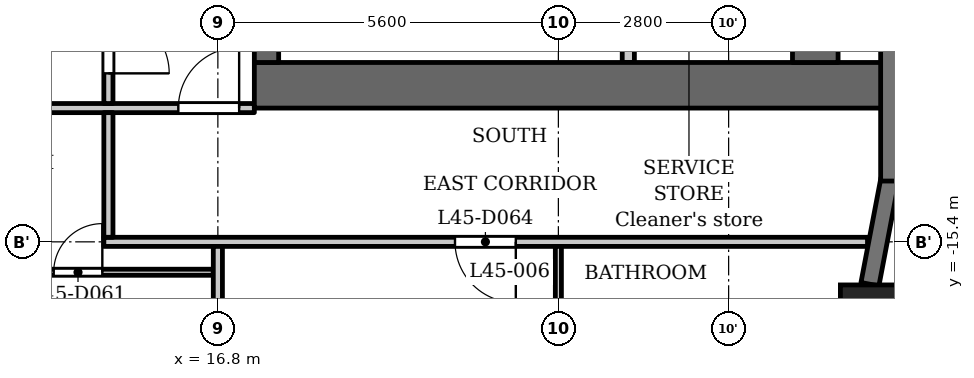
"""IFC4 building model, lengths in metres.
Left out: names, types, materials, properties, quantities, classifications, styles, units other than length and angle.
Written with IfcOpenShell. Run it as: python <this file> out.ifc"""

import sys

from ifc_helpers import new_model, si_unit, direction, frame, frame_2d, origin, origin_2d, place, context, subcontext, project, spatial, rectangle, extrude, element, fill, save


model = new_model("IFC4")
c1 = context("Model", 3, precision=1e-05, world=origin(), true_north=direction((0.0, 1.0)))
c2 = subcontext(c1, "Body", "Model", "MODEL_VIEW")
j1 = project(units=[si_unit("LENGTHUNIT", "METRE"), si_unit("PLANEANGLEUNIT", "RADIAN")], contexts=[c1])
p1 = place(None, origin())
s1 = spatial("IfcSite", under=j1, at=p1, CompositionType="ELEMENT")
p2 = place(p1, origin())
s2 = spatial("IfcBuilding", under=s1, at=p2, CompositionType="ELEMENT")
p3 = place(p2, frame((0.0, 0.0, 174.6)))
s3 = spatial("IfcBuildingStorey", under=s2, at=p3, CompositionType="ELEMENT", Elevation=174.6)
p4 = place(p3, frame((27.538, -16.609, 0.0), z_axis=(0.0, 0.0, 1.0), x_axis=(1.0, 0.0, 0.0)))
e1 = element("IfcColumn", 1, at=p4, inside=s3, PredefinedType="COLUMN", context=c2, shape_type="SweptSolid", body=[
    extrude(rectangle(XDim=1.0, YDim=1.0, at=origin_2d()), origin(), (0.0, 0.0, 1.0), 3.5),
])
p5 = place(p3, frame((27.524, -16.097, 0.0), z_axis=(0.0, 0.0, 1.0), x_axis=(0.187259034321, 0.982310569049, 0.0)))
e2 = element("IfcWall", 2, at=p5, inside=s3, PredefinedType="SOLIDWALL", context=c2, shape_type="SweptSolid", body=[
    extrude(rectangle(XDim=1.756, YDim=0.3, at=frame_2d((0.878, 0.0))), origin(), (0.0, 0.0, 1.0), 2.4),
])
p6 = place(p3, frame((27.85, -14.4, 0.0), z_axis=(0.0, 0.0, 1.0), x_axis=(0.0, 1.0, 0.0)))
e3 = element("IfcWall", 3, at=p6, inside=s3, PredefinedType="SOLIDWALL", context=c2, shape_type="SweptSolid", body=[
    extrude(rectangle(XDim=2.7, YDim=0.3, at=frame_2d((1.35, 0.0))), origin(), (0.0, 0.0, 1.0), 2.4),
])
p7 = place(p3, frame((17.4, -12.825, 0.0), z_axis=(0.0, 0.0, 1.0), x_axis=(1.0, 0.0, 0.0)))
e4 = element("IfcWall", 4, at=p7, inside=s3, PredefinedType="SHEAR", context=c2, shape_type="SweptSolid", body=[
    extrude(rectangle(XDim=10.4, YDim=0.75, at=frame_2d((5.2, 0.0))), origin(), (0.0, 0.0, 1.0), 3.15),
])
p8 = place(p3, frame((17.6, -12.45, 0.0), z_axis=(0.0, 0.0, 1.0), x_axis=(0.0, 1.0, 0.0)))
e5 = element("IfcWall", 5, at=p8, inside=s3, PredefinedType="SHEAR", context=c2, shape_type="SweptSolid", body=[
    extrude(rectangle(XDim=24.9, YDim=0.4, at=frame_2d((12.45, 0.0))), origin(), (0.0, 0.0, 1.0), 3.15),
])
p9 = place(p8, frame((8.65, 0.0, 0.0)))
e6 = element("IfcOpeningElement", 6, at=p9, cuts=e5, PredefinedType="OPENING", context=c2, shape_type="SweptSolid", body=[
    extrude(rectangle(XDim=0.9, YDim=2.1, at=frame_2d((0.45, 1.05))), frame((0.0, 0.21, 0.0), z_axis=(0.0, -1.0, 0.0), x_axis=(1.0, 0.0, 0.0)), (0.0, 0.0, 1.0), 0.42),
])
p10 = place(p8, frame((15.6, 0.0, 0.0)))
e7 = element("IfcOpeningElement", 7, at=p10, cuts=e5, PredefinedType="OPENING", context=c2, shape_type="SweptSolid", body=[
    extrude(rectangle(XDim=1.1, YDim=2.1, at=frame_2d((0.55, 1.05))), frame((0.0, 0.21, 0.0), z_axis=(0.0, -1.0, 0.0), x_axis=(1.0, 0.0, 0.0)), (0.0, 0.0, 1.0), 0.42),
])
p11 = place(p8, frame((18.0, 0.0, 0.0)))
e8 = element("IfcOpeningElement", 8, at=p11, cuts=e5, PredefinedType="OPENING", context=c2, shape_type="SweptSolid", body=[
    extrude(rectangle(XDim=1.1, YDim=2.1, at=frame_2d((0.55, 1.05))), frame((0.0, 0.21, 0.0), z_axis=(0.0, -1.0, 0.0), x_axis=(1.0, 0.0, 0.0)), (0.0, 0.0, 1.0), 0.42),
])
p12 = place(p8, frame((23.025, 0.0, 0.0)))
e9 = element("IfcOpeningElement", 9, at=p12, cuts=e5, PredefinedType="OPENING", context=c2, shape_type="SweptSolid", body=[
    extrude(rectangle(XDim=1.1, YDim=2.1, at=frame_2d((0.55, 1.05))), frame((0.0, 0.21, 0.0), z_axis=(0.0, -1.0, 0.0), x_axis=(1.0, 0.0, 0.0)), (0.0, 0.0, 1.0), 0.42),
])
p13 = place(p8, frame((0.775, 0.0, 0.0)))
e10 = element("IfcOpeningElement", 10, at=p13, cuts=e5, PredefinedType="OPENING", context=c2, shape_type="SweptSolid", body=[
    extrude(rectangle(XDim=1.1, YDim=2.1, at=frame_2d((0.55, 1.05))), frame((0.0, 0.21, 0.0), z_axis=(0.0, -1.0, 0.0), x_axis=(1.0, 0.0, 0.0)), (0.0, 0.0, 1.0), 0.42),
])
p14 = place(p8, frame((12.925, 0.0, 0.0)))
e11 = element("IfcOpeningElement", 11, at=p14, cuts=e5, PredefinedType="OPENING", context=c2, shape_type="SweptSolid", body=[
    extrude(rectangle(XDim=1.8, YDim=2.1, at=frame_2d((0.9, 1.05))), frame((0.0, 0.21, 0.0), z_axis=(0.0, -1.0, 0.0), x_axis=(1.0, 0.0, 0.0)), (0.0, 0.0, 1.0), 0.42),
])
p15 = place(p3, frame((26.625, -12.45, 0.0), z_axis=(0.0, 0.0, 1.0), x_axis=(0.0, 1.0, 0.0)))
e12 = element("IfcWall", 12, at=p15, inside=s3, PredefinedType="SHEAR", context=c2, shape_type="SweptSolid", body=[
    extrude(rectangle(XDim=24.9, YDim=0.75, at=frame_2d((12.45, 0.0))), origin(), (0.0, 0.0, 1.0), 3.15),
])
p16 = place(p3, frame((23.55, -12.45, 0.0), z_axis=(0.0, 0.0, 1.0), x_axis=(0.0, 1.0, 0.0)))
e13 = element("IfcWall", 13, at=p16, inside=s3, PredefinedType="PARTITIONING", context=c2, shape_type="SweptSolid", body=[
    extrude(rectangle(XDim=2.65, YDim=0.2, at=frame_2d((1.325, 0.0))), origin(), (0.0, 0.0, 1.0), 3.15),
])
p17 = place(p16, frame((0.875, 0.0, 0.0)))
e14 = element("IfcOpeningElement", 14, at=p17, cuts=e13, PredefinedType="OPENING", context=c2, shape_type="SweptSolid", body=[
    extrude(rectangle(XDim=0.9, YDim=2.1, at=frame_2d((0.45, 1.05))), frame((0.0, 0.11, 0.0), z_axis=(0.0, -1.0, 0.0), x_axis=(1.0, 0.0, 0.0)), (0.0, 0.0, 1.0), 0.22),
])
p18 = place(p3, frame((-16.725, -15.9, 0.0), z_axis=(0.0, 0.0, 1.0), x_axis=(1.0, 0.0, 0.0)))
e15 = element("IfcWall", 15, at=p18, inside=s3, PredefinedType="PARTITIONING", context=c2, shape_type="SweptSolid", body=[
    extrude(rectangle(XDim=33.45, YDim=0.1, at=frame_2d((16.725, 0.0))), origin(), (0.0, 0.0, 1.0), 3.15),
])
p19 = place(p18, frame((9.675, 0.0, 0.0)))
e16 = element("IfcOpeningElement", 16, at=p19, cuts=e15, PredefinedType="OPENING", context=c2, shape_type="SweptSolid", body=[
    extrude(rectangle(XDim=0.8, YDim=2.1, at=frame_2d((0.4, 1.05))), frame((0.0, 0.06, 0.0), z_axis=(0.0, -1.0, 0.0), x_axis=(1.0, 0.0, 0.0)), (0.0, 0.0, 1.0), 0.12),
])
p20 = place(p18, frame((4.075, 0.0, 0.0)))
e17 = element("IfcOpeningElement", 17, at=p20, cuts=e15, PredefinedType="OPENING", context=c2, shape_type="SweptSolid", body=[
    extrude(rectangle(XDim=0.9, YDim=2.1, at=frame_2d((0.45, 1.05))), frame((0.0, 0.06, 0.0), z_axis=(0.0, -1.0, 0.0), x_axis=(1.0, 0.0, 0.0)), (0.0, 0.0, 1.0), 0.12),
])
p21 = place(p18, frame((20.875, 0.0, 0.0)))
e18 = element("IfcOpeningElement", 18, at=p21, cuts=e15, PredefinedType="OPENING", context=c2, shape_type="SweptSolid", body=[
    extrude(rectangle(XDim=0.8, YDim=2.1, at=frame_2d((0.4, 1.05))), frame((0.0, 0.06, 0.0), z_axis=(0.0, -1.0, 0.0), x_axis=(1.0, 0.0, 0.0)), (0.0, 0.0, 1.0), 0.12),
])
p22 = place(p18, frame((15.275, 0.0, 0.0)))
e19 = element("IfcOpeningElement", 19, at=p22, cuts=e15, PredefinedType="OPENING", context=c2, shape_type="SweptSolid", body=[
    extrude(rectangle(XDim=0.9, YDim=2.1, at=frame_2d((0.45, 1.05))), frame((0.0, 0.06, 0.0), z_axis=(0.0, -1.0, 0.0), x_axis=(1.0, 0.0, 0.0)), (0.0, 0.0, 1.0), 0.12),
])
p23 = place(p18, frame((30.825, 0.0, 0.0)))
e20 = element("IfcOpeningElement", 20, at=p23, cuts=e15, PredefinedType="OPENING", context=c2, shape_type="SweptSolid", body=[
    extrude(rectangle(XDim=0.8, YDim=2.1, at=frame_2d((0.4, 1.05))), frame((0.0, 0.06, 0.0), z_axis=(0.0, -1.0, 0.0), x_axis=(1.0, 0.0, 0.0)), (0.0, 0.0, 1.0), 0.12),
])
p24 = place(p18, frame((26.475, 0.0, 0.0)))
e21 = element("IfcOpeningElement", 21, at=p24, cuts=e15, PredefinedType="OPENING", context=c2, shape_type="SweptSolid", body=[
    extrude(rectangle(XDim=0.9, YDim=2.1, at=frame_2d((0.45, 1.05))), frame((0.0, 0.06, 0.0), z_axis=(0.0, -1.0, 0.0), x_axis=(1.0, 0.0, 0.0)), (0.0, 0.0, 1.0), 0.12),
])
p25 = place(p3, frame((14.925, -15.4, 0.0), z_axis=(0.0, 0.0, 1.0), x_axis=(1.0, 0.0, 0.0)))
e22 = element("IfcWall", 22, at=p25, inside=s3, PredefinedType="PARTITIONING", context=c2, shape_type="SweptSolid", body=[
    extrude(rectangle(XDim=12.559, YDim=0.15, at=frame_2d((6.279, 0.0))), origin(), (0.0, 0.0, 1.0), 3.15),
])
p26 = place(p25, frame((5.775, 0.0, 0.0)))
e23 = element("IfcOpeningElement", 23, at=p26, cuts=e22, PredefinedType="OPENING", context=c2, shape_type="SweptSolid", body=[
    extrude(rectangle(XDim=1.0, YDim=2.1, at=frame_2d((0.5, 1.05))), frame((0.0, 0.085, 0.0), z_axis=(0.0, -1.0, 0.0), x_axis=(1.0, 0.0, 0.0)), (0.0, 0.0, 1.0), 0.17),
])
p27 = place(p3, frame((-17.4, -13.2, 0.0), z_axis=(0.0, 0.0, 1.0), x_axis=(1.0, 0.0, 0.0)))
e24 = element("IfcWall", 24, at=p27, inside=s3, PredefinedType="PARTITIONING", context=c2, shape_type="SweptSolid", body=[
    extrude(rectangle(XDim=34.8, YDim=0.15, at=frame_2d((17.4, 0.0))), origin(), (0.0, 0.0, 1.0), 3.15),
])
p28 = place(p27, frame((0.15, 0.0, 0.0)))
e25 = element("IfcOpeningElement", 25, at=p28, cuts=e24, PredefinedType="OPENING", context=c2, shape_type="SweptSolid", body=[
    extrude(rectangle(XDim=1.0, YDim=2.1, at=frame_2d((0.5, 1.05))), frame((0.0, 0.085, 0.0), z_axis=(0.0, -1.0, 0.0), x_axis=(1.0, 0.0, 0.0)), (0.0, 0.0, 1.0), 0.17),
])
p29 = place(p27, frame((33.55, 0.0, 0.0)))
e26 = element("IfcOpeningElement", 26, at=p29, cuts=e24, PredefinedType="OPENING", context=c2, shape_type="SweptSolid", body=[
    extrude(rectangle(XDim=1.0, YDim=2.1, at=frame_2d((0.5, 1.05))), frame((0.0, 0.085, 0.0), z_axis=(0.0, -1.0, 0.0), x_axis=(1.0, 0.0, 0.0)), (0.0, 0.0, 1.0), 0.17),
])
p30 = place(p27, frame((15.7, 0.0, 0.0)))
e27 = element("IfcOpeningElement", 27, at=p30, cuts=e24, PredefinedType="OPENING", context=c2, shape_type="SweptSolid", body=[
    extrude(rectangle(XDim=1.0, YDim=2.1, at=frame_2d((0.5, 1.05))), frame((0.0, 0.085, 0.0), z_axis=(0.0, -1.0, 0.0), x_axis=(1.0, 0.0, 0.0)), (0.0, 0.0, 1.0), 0.17),
])
p31 = place(p27, frame((26.9, 0.0, 0.0)))
e28 = element("IfcOpeningElement", 28, at=p31, cuts=e24, PredefinedType="OPENING", context=c2, shape_type="SweptSolid", body=[
    extrude(rectangle(XDim=1.0, YDim=2.1, at=frame_2d((0.5, 1.05))), frame((0.0, 0.085, 0.0), z_axis=(0.0, -1.0, 0.0), x_axis=(1.0, 0.0, 0.0)), (0.0, 0.0, 1.0), 0.17),
])
p32 = place(p3, frame((15.0, -15.325, 0.0), z_axis=(0.0, 0.0, 1.0), x_axis=(0.0, 1.0, 0.0)))
e29 = element("IfcWall", 29, at=p32, inside=s3, PredefinedType="PARTITIONING", context=c2, shape_type="SweptSolid", body=[
    extrude(rectangle(XDim=2.05, YDim=0.15, at=frame_2d((1.025, 0.0))), origin(), (0.0, 0.0, 1.0), 3.15),
])
p33 = place(p3, frame((15.0, -13.125, 0.0), z_axis=(0.0, 0.0, 1.0), x_axis=(0.0, 1.0, 0.0)))
e30 = element("IfcWall", 30, at=p33, inside=s3, PredefinedType="PARTITIONING", context=c2, shape_type="SweptSolid", body=[
    extrude(rectangle(XDim=6.356, YDim=0.15, at=frame_2d((3.178, 0.0))), origin(), (0.0, 0.0, 1.0), 3.15),
])
p34 = place(p33, frame((0.496, 0.0, 0.0)))
e31 = element("IfcOpeningElement", 31, at=p34, cuts=e30, PredefinedType="OPENING", context=c2, shape_type="SweptSolid", body=[
    extrude(rectangle(XDim=1.0, YDim=2.1, at=frame_2d((0.5, 1.05))), frame((0.0, 0.085, 0.0), z_axis=(0.0, -1.0, 0.0), x_axis=(1.0, 0.0, 0.0)), (0.0, 0.0, 1.0), 0.17),
])
p35 = place(p3, frame((16.8, -22.88, 0.0), z_axis=(0.0, 0.0, 1.0), x_axis=(0.0, 1.0, 0.0)))
e32 = element("IfcWall", 32, at=p35, inside=s3, PredefinedType="PARTITIONING", context=c2, shape_type="SweptSolid", body=[
    extrude(rectangle(XDim=7.405, YDim=0.15, at=frame_2d((3.702, 0.0))), origin(), (0.0, 0.0, 1.0), 3.15),
])
p36 = place(p3, frame((22.4, -18.05, 0.0), z_axis=(0.0, 0.0, 1.0), x_axis=(0.0, 1.0, 0.0)))
e33 = element("IfcWall", 33, at=p36, inside=s3, PredefinedType="PARTITIONING", context=c2, shape_type="SweptSolid", body=[
    extrude(rectangle(XDim=2.575, YDim=0.1, at=frame_2d((1.288, 0.0))), origin(), (0.0, 0.0, 1.0), 3.15),
])
p37 = place(p34, origin())
e34 = element("IfcDoor", 34, at=p37, inside=s3, OperationType="SINGLE_SWING_LEFT", PredefinedType="DOOR", context=c2, shape_type="SweptSolid", body=[
    extrude(rectangle(XDim=1.0, YDim=2.1, at=frame_2d((0.5, 1.05))), frame((0.0, 0.025, 0.0), z_axis=(0.0, -1.0, 0.0), x_axis=(1.0, 0.0, 0.0)), (0.0, 0.0, 1.0), 0.05),
])
fill(e31, e34)
p38 = place(p29, origin())
e35 = element("IfcDoor", 35, at=p38, inside=s3, OperationType="SINGLE_SWING_LEFT", PredefinedType="DOOR", context=c2, shape_type="SweptSolid", body=[
    extrude(rectangle(XDim=1.0, YDim=2.1, at=frame_2d((0.5, 1.05))), frame((0.0, 0.025, 0.0), z_axis=(0.0, -1.0, 0.0), x_axis=(1.0, 0.0, 0.0)), (0.0, 0.0, 1.0), 0.05),
])
fill(e26, e35)
p39 = place(p23, origin())
e36 = element("IfcDoor", 36, at=p39, inside=s3, OperationType="SINGLE_SWING_LEFT", PredefinedType="DOOR", context=c2, shape_type="SweptSolid", body=[
    extrude(rectangle(XDim=0.8, YDim=2.1, at=frame_2d((0.4, 1.05))), frame((0.0, 0.025, 0.0), z_axis=(0.0, -1.0, 0.0), x_axis=(1.0, 0.0, 0.0)), (0.0, 0.0, 1.0), 0.05),
])
fill(e20, e36)
p40 = place(p26, origin())
e37 = element("IfcDoor", 37, at=p40, inside=s3, OperationType="SINGLE_SWING_RIGHT", PredefinedType="DOOR", context=c2, shape_type="SweptSolid", body=[
    extrude(rectangle(XDim=1.0, YDim=2.1, at=frame_2d((0.5, 1.05))), frame((0.0, 0.025, 0.0), z_axis=(0.0, -1.0, 0.0), x_axis=(1.0, 0.0, 0.0)), (0.0, 0.0, 1.0), 0.05),
])
fill(e23, e37)
save(model, sys.argv[1])
